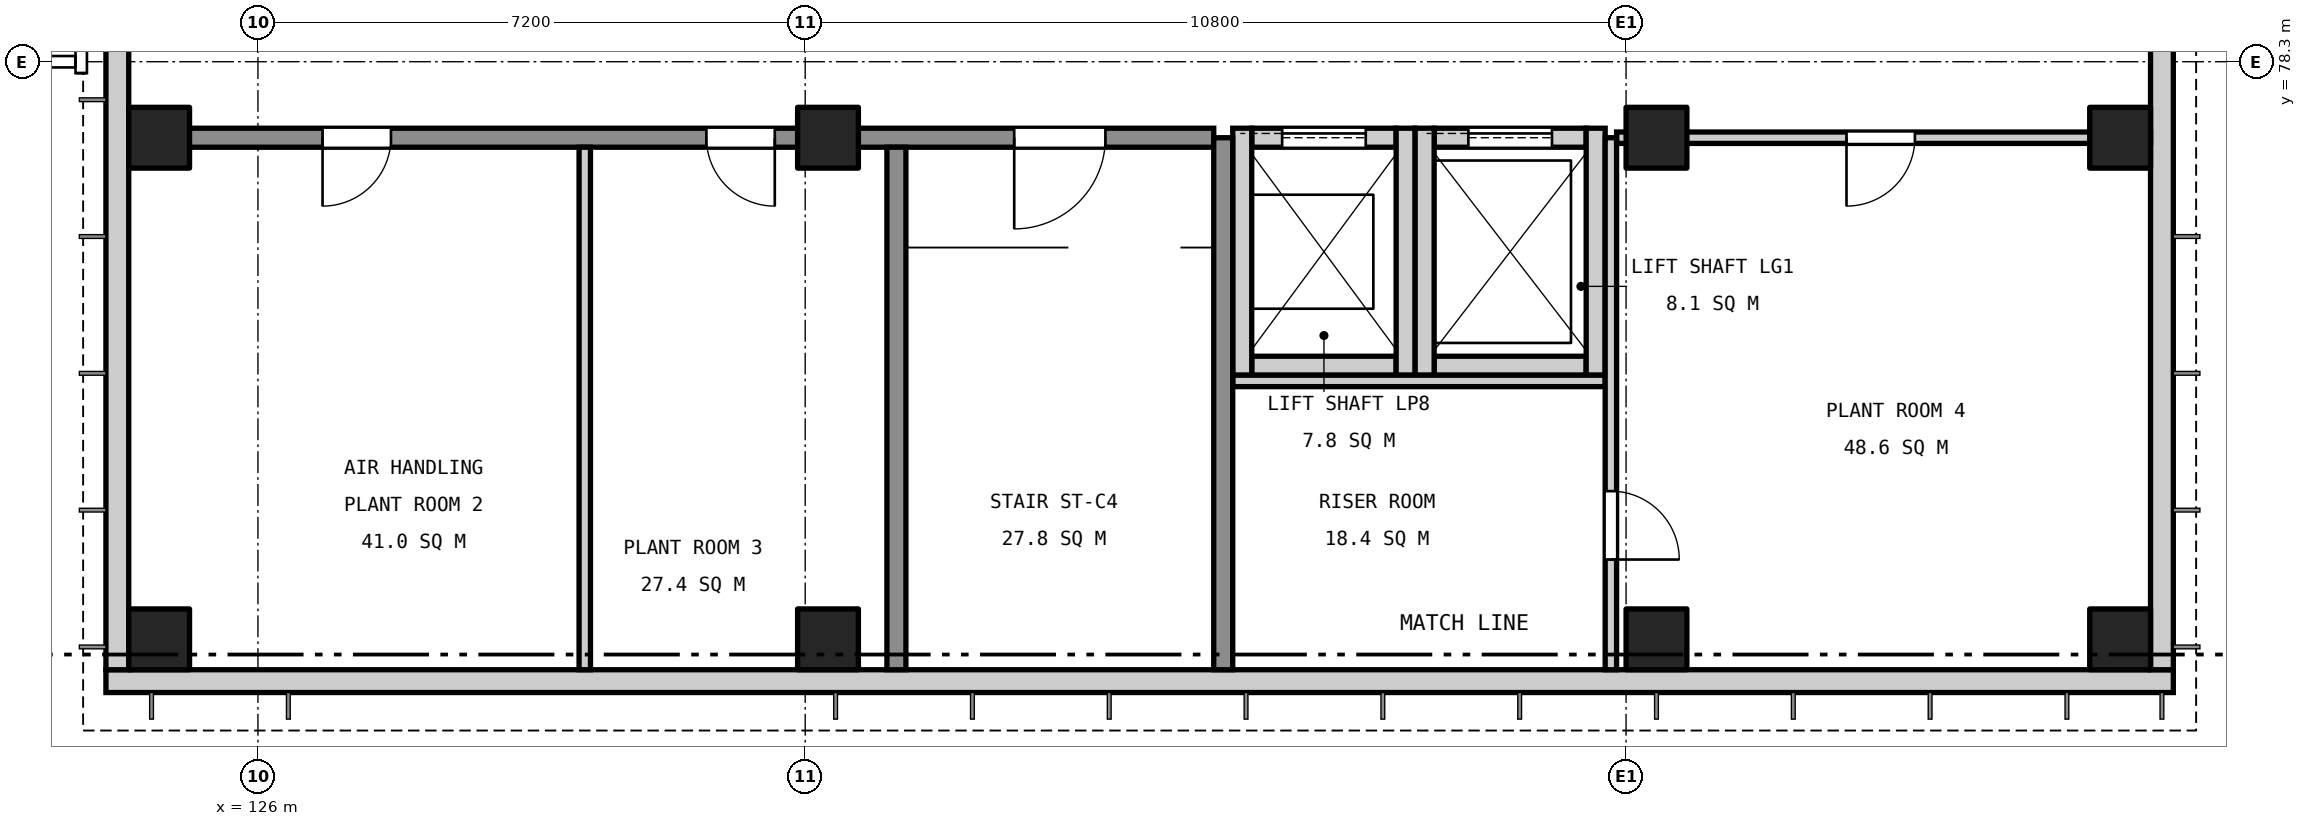
"""IFC4 building model, lengths in metres.
Left out: names, types, materials, properties, quantities, classifications, styles, units other than length and angle.
Written with IfcOpenShell. Run it as: python <this file> out.ifc"""

import sys

from ifc_helpers import new_model, si_unit, direction, frame, frame_2d, origin, origin_2d, place, context, subcontext, project, spatial, rectangle, extrude, element, fill, save


model = new_model("IFC4")
c1 = context("Model", 3, precision=1e-05, world=origin(), true_north=direction((0.0, 1.0)))
c2 = subcontext(c1, "Body", "Model", "MODEL_VIEW")
j1 = project(units=[si_unit("LENGTHUNIT", "METRE"), si_unit("PLANEANGLEUNIT", "RADIAN")], contexts=[c1])
p1 = place(None, origin())
s1 = spatial("IfcSite", under=j1, at=p1, CompositionType="ELEMENT")
p2 = place(p1, origin())
s2 = spatial("IfcBuilding", under=s1, at=p2, CompositionType="ELEMENT")
p3 = place(p2, frame((0.0, 0.0, 22.2)))
s3 = spatial("IfcBuildingStorey", under=s2, at=p3, CompositionType="ELEMENT", Elevation=22.2)
p4 = place(p3, frame((139.075, 74.3, 0.0), z_axis=(0.0, 0.0, 1.0), x_axis=(1.0, 0.0, 0.0)))
e1 = element("IfcWall", 1, at=p4, inside=s3, PredefinedType="SOLIDWALL", context=c2, shape_type="SweptSolid", body=[
    extrude(rectangle(XDim=1.9, YDim=0.25, at=frame_2d((0.95, 0.0))), origin(), (0.0, 0.0, 1.0), 4.35),
])
p5 = place(p3, frame((139.075, 77.3, 0.0), z_axis=(0.0, 0.0, 1.0), x_axis=(1.0, 0.0, 0.0)))
e2 = element("IfcWall", 2, at=p5, inside=s3, PredefinedType="SOLIDWALL", context=c2, shape_type="SweptSolid", body=[
    extrude(rectangle(XDim=1.9, YDim=0.25, at=frame_2d((0.95, 0.0))), origin(), (0.0, 0.0, 1.0), 4.35),
])
p6 = place(p5, frame((0.4, 0.0, 0.0)))
e3 = element("IfcOpeningElement", 3, at=p6, cuts=e2, PredefinedType="OPENING", context=c2, shape_type="SweptSolid", body=[
    extrude(rectangle(XDim=1.1, YDim=2.1, at=frame_2d((0.55, 1.05))), frame((0.0, 0.135, 0.0), z_axis=(0.0, -1.0, 0.0), x_axis=(1.0, 0.0, 0.0)), (0.0, 0.0, 1.0), 0.27),
])
for number, where, z_axis, x_axis in (
    (4, (138.95, 74.175, 0.0), (0.0, 0.0, 1.0), (0.0, 1.0, 0.0)),
    (5, (141.1, 74.175, 0.0), (0.0, 0.0, 1.0), (0.0, 1.0, 0.0)),
):
    element("IfcWall", number, at=place(p3, frame(where, z_axis=z_axis, x_axis=x_axis)), inside=s3, PredefinedType="SOLIDWALL", context=c2, shape_type="SweptSolid", body=[
        extrude(rectangle(XDim=3.25, YDim=0.25, at=frame_2d((1.625, 0.0))), origin(), (0.0, 0.0, 1.0), 4.35),
    ])
p7 = place(p3, frame((141.475, 74.3, 0.0), z_axis=(0.0, 0.0, 1.0), x_axis=(1.0, 0.0, 0.0)))
e6 = element("IfcWall", 6, at=p7, inside=s3, PredefinedType="SOLIDWALL", context=c2, shape_type="SweptSolid", body=[
    extrude(rectangle(XDim=2.0, YDim=0.25, at=frame_2d((1.0, 0.0))), origin(), (0.0, 0.0, 1.0), 4.35),
])
p8 = place(p3, frame((141.475, 77.3, 0.0), z_axis=(0.0, 0.0, 1.0), x_axis=(1.0, 0.0, 0.0)))
e7 = element("IfcWall", 7, at=p8, inside=s3, PredefinedType="SOLIDWALL", context=c2, shape_type="SweptSolid", body=[
    extrude(rectangle(XDim=2.0, YDim=0.25, at=frame_2d((1.0, 0.0))), origin(), (0.0, 0.0, 1.0), 4.35),
])
p9 = place(p8, frame((0.45, 0.0, 0.0)))
e8 = element("IfcOpeningElement", 8, at=p9, cuts=e7, PredefinedType="OPENING", context=c2, shape_type="SweptSolid", body=[
    extrude(rectangle(XDim=1.1, YDim=2.1, at=frame_2d((0.55, 1.05))), frame((0.0, 0.135, 0.0), z_axis=(0.0, -1.0, 0.0), x_axis=(1.0, 0.0, 0.0)), (0.0, 0.0, 1.0), 0.27),
])
for number, where, z_axis, x_axis in (
    (9, (141.35, 74.175, 0.0), (0.0, 0.0, 1.0), (0.0, 1.0, 0.0)),
    (10, (143.6, 74.175, 0.0), (0.0, 0.0, 1.0), (0.0, 1.0, 0.0)),
):
    element("IfcWall", number, at=place(p3, frame(where, z_axis=z_axis, x_axis=x_axis)), inside=s3, PredefinedType="SOLIDWALL", context=c2, shape_type="SweptSolid", body=[
        extrude(rectangle(XDim=3.25, YDim=0.25, at=frame_2d((1.625, 0.0))), origin(), (0.0, 0.0, 1.0), 4.35),
    ])
for number, where, z_axis, x_axis in (
    (11, (124.7, 70.7, 0.0), (0.0, 0.0, 1.0), (1.0, 0.0, 0.0)),
    (12, (124.7, 77.3, 0.0), (0.0, 0.0, 1.0), (1.0, 0.0, 0.0)),
    (13, (133.5, 70.7, 0.0), (0.0, 0.0, 1.0), (1.0, 0.0, 0.0)),
    (14, (133.5, 77.3, 0.0), (0.0, 0.0, 1.0), (1.0, 0.0, 0.0)),
    (15, (144.4, 70.7, 0.0), (0.0, 0.0, 1.0), (1.0, 0.0, 0.0)),
    (16, (144.4, 77.3, 0.0), (0.0, 0.0, 1.0), (1.0, 0.0, 0.0)),
    (17, (150.5, 70.7, 0.0), (0.0, 0.0, 1.0), (1.0, 0.0, 0.0)),
    (18, (150.5, 77.3, 0.0), (0.0, 0.0, 1.0), (1.0, 0.0, 0.0)),
):
    element("IfcColumn", number, at=place(p3, frame(where, z_axis=z_axis, x_axis=x_axis)), inside=s3, PredefinedType="COLUMN", context=c2, shape_type="SweptSolid", body=[
        extrude(rectangle(XDim=0.8, YDim=0.8, at=origin_2d()), origin(), (0.0, 0.0, 1.0), 4.8),
    ])
p10 = place(p3, frame((124.0, 70.15, 0.0), z_axis=(0.0, 0.0, 1.0), x_axis=(1.0, 0.0, 0.0)))
e19 = element("IfcWall", 19, at=p10, inside=s3, PredefinedType="SOLIDWALL", context=c2, shape_type="SweptSolid", body=[
    extrude(rectangle(XDim=27.2, YDim=0.3, at=frame_2d((13.6, 0.0))), origin(), (0.0, 0.0, 1.0), 4.35),
])
for number, where, z_axis, x_axis in (
    (20, (124.15, 70.3, 0.0), (0.0, 0.0, 1.0), (0.0, 1.0, 0.0)),
    (21, (151.05, 70.3, 0.0), (0.0, 0.0, 1.0), (0.0, 1.0, 0.0)),
):
    element("IfcWall", number, at=place(p3, frame(where, z_axis=z_axis, x_axis=x_axis)), inside=s3, PredefinedType="SOLIDWALL", context=c2, shape_type="SweptSolid", body=[
        extrude(rectangle(XDim=36.5, YDim=0.3, at=frame_2d((18.25, 0.0))), origin(), (0.0, 0.0, 1.0), 4.35),
    ])
p11 = place(p3, frame((138.825, 74.1, 0.0), z_axis=(0.0, 0.0, 1.0), x_axis=(1.0, 0.0, 0.0)))
e22 = element("IfcWall", 22, at=p11, inside=s3, PredefinedType="SOLIDWALL", context=c2, shape_type="SweptSolid", body=[
    extrude(rectangle(XDim=4.9, YDim=0.15, at=frame_2d((2.45, 0.0))), origin(), (0.0, 0.0, 1.0), 4.35),
])
p12 = place(p3, frame((124.3, 77.3, 0.0), z_axis=(0.0, 0.0, 1.0), x_axis=(1.0, 0.0, 0.0)))
e23 = element("IfcWall", 23, at=p12, inside=s3, PredefinedType="SOLIDWALL", context=c2, shape_type="SweptSolid", body=[
    extrude(rectangle(XDim=14.275, YDim=0.25, at=frame_2d((7.137, 0.0))), origin(), (0.0, 0.0, 1.0), 4.35),
])
p13 = place(p12, frame((2.55, 0.0, 0.0)))
e24 = element("IfcOpeningElement", 24, at=p13, cuts=e23, PredefinedType="OPENING", context=c2, shape_type="SweptSolid", body=[
    extrude(rectangle(XDim=0.9, YDim=2.1, at=frame_2d((0.45, 1.05))), frame((0.0, 0.135, 0.0), z_axis=(0.0, -1.0, 0.0), x_axis=(1.0, 0.0, 0.0)), (0.0, 0.0, 1.0), 0.27),
])
p14 = place(p12, frame((7.6, 0.0, 0.0)))
e25 = element("IfcOpeningElement", 25, at=p14, cuts=e23, PredefinedType="OPENING", context=c2, shape_type="SweptSolid", body=[
    extrude(rectangle(XDim=0.9, YDim=2.1, at=frame_2d((0.45, 1.05))), frame((0.0, 0.135, 0.0), z_axis=(0.0, -1.0, 0.0), x_axis=(1.0, 0.0, 0.0)), (0.0, 0.0, 1.0), 0.27),
])
p15 = place(p12, frame((11.65, 0.0, 0.0)))
e26 = element("IfcOpeningElement", 26, at=p15, cuts=e23, PredefinedType="OPENING", context=c2, shape_type="SweptSolid", body=[
    extrude(rectangle(XDim=1.2, YDim=2.1, at=frame_2d((0.6, 1.05))), frame((0.0, 0.135, 0.0), z_axis=(0.0, -1.0, 0.0), x_axis=(1.0, 0.0, 0.0)), (0.0, 0.0, 1.0), 0.27),
])
p16 = place(p3, frame((143.875, 77.3, 0.0), z_axis=(0.0, 0.0, 1.0), x_axis=(1.0, 0.0, 0.0)))
e27 = element("IfcWall", 27, at=p16, inside=s3, PredefinedType="SOLIDWALL", context=c2, shape_type="SweptSolid", body=[
    extrude(rectangle(XDim=7.025, YDim=0.15, at=frame_2d((3.512, 0.0))), origin(), (0.0, 0.0, 1.0), 4.35),
])
p17 = place(p16, frame((3.025, 0.0, 0.0)))
e28 = element("IfcOpeningElement", 28, at=p17, cuts=e27, PredefinedType="OPENING", context=c2, shape_type="SweptSolid", body=[
    extrude(rectangle(XDim=0.9, YDim=2.1, at=frame_2d((0.45, 1.05))), frame((0.0, 0.085, 0.0), z_axis=(0.0, -1.0, 0.0), x_axis=(1.0, 0.0, 0.0)), (0.0, 0.0, 1.0), 0.17),
])
p18 = place(p3, frame((130.3, 70.3, 0.0), z_axis=(0.0, 0.0, 1.0), x_axis=(0.0, 1.0, 0.0)))
e29 = element("IfcWall", 29, at=p18, inside=s3, PredefinedType="SOLIDWALL", context=c2, shape_type="SweptSolid", body=[
    extrude(rectangle(XDim=6.875, YDim=0.15, at=frame_2d((3.438, 0.0))), origin(), (0.0, 0.0, 1.0), 4.35),
])
p19 = place(p3, frame((134.4, 70.3, 0.0), z_axis=(0.0, 0.0, 1.0), x_axis=(0.0, 1.0, 0.0)))
e30 = element("IfcWall", 30, at=p19, inside=s3, PredefinedType="SOLIDWALL", context=c2, shape_type="SweptSolid", body=[
    extrude(rectangle(XDim=6.875, YDim=0.25, at=frame_2d((3.438, 0.0))), origin(), (0.0, 0.0, 1.0), 4.35),
])
p20 = place(p3, frame((138.7, 70.3, 0.0), z_axis=(0.0, 0.0, 1.0), x_axis=(0.0, 1.0, 0.0)))
e31 = element("IfcWall", 31, at=p20, inside=s3, PredefinedType="SOLIDWALL", context=c2, shape_type="SweptSolid", body=[
    extrude(rectangle(XDim=7.0, YDim=0.25, at=frame_2d((3.5, 0.0))), origin(), (0.0, 0.0, 1.0), 4.35),
])
p21 = place(p3, frame((143.8, 70.3, 0.0), z_axis=(0.0, 0.0, 1.0), x_axis=(0.0, 1.0, 0.0)))
e32 = element("IfcWall", 32, at=p21, inside=s3, PredefinedType="SOLIDWALL", context=c2, shape_type="SweptSolid", body=[
    extrude(rectangle(XDim=7.0, YDim=0.15, at=frame_2d((3.5, 0.0))), origin(), (0.0, 0.0, 1.0), 4.35),
])
p22 = place(p21, frame((1.45, 0.0, 0.0)))
e33 = element("IfcOpeningElement", 33, at=p22, cuts=e32, PredefinedType="OPENING", context=c2, shape_type="SweptSolid", body=[
    extrude(rectangle(XDim=0.9, YDim=2.1, at=frame_2d((0.45, 1.05))), frame((0.0, 0.085, 0.0), z_axis=(0.0, -1.0, 0.0), x_axis=(1.0, 0.0, 0.0)), (0.0, 0.0, 1.0), 0.17),
])
p23 = place(p13, frame((0.9, 0.0, 0.0), z_axis=(0.0, 0.0, 1.0), x_axis=(-1.0, 0.0, 0.0)))
e34 = element("IfcDoor", 34, at=p23, inside=s3, OperationType="SINGLE_SWING_RIGHT", PredefinedType="DOOR", context=c2, shape_type="SweptSolid", body=[
    extrude(rectangle(XDim=0.9, YDim=2.1, at=frame_2d((0.45, 1.05))), frame((0.0, 0.025, 0.0), z_axis=(0.0, -1.0, 0.0), x_axis=(1.0, 0.0, 0.0)), (0.0, 0.0, 1.0), 0.05),
])
fill(e24, e34)
p24 = place(p14, frame((0.9, 0.0, 0.0), z_axis=(0.0, 0.0, 1.0), x_axis=(-1.0, 0.0, 0.0)))
e35 = element("IfcDoor", 35, at=p24, inside=s3, OperationType="SINGLE_SWING_LEFT", PredefinedType="DOOR", context=c2, shape_type="SweptSolid", body=[
    extrude(rectangle(XDim=0.9, YDim=2.1, at=frame_2d((0.45, 1.05))), frame((0.0, 0.025, 0.0), z_axis=(0.0, -1.0, 0.0), x_axis=(1.0, 0.0, 0.0)), (0.0, 0.0, 1.0), 0.05),
])
fill(e25, e35)
p25 = place(p17, frame((0.9, 0.0, 0.0), z_axis=(0.0, 0.0, 1.0), x_axis=(-1.0, 0.0, 0.0)))
e36 = element("IfcDoor", 36, at=p25, inside=s3, OperationType="SINGLE_SWING_RIGHT", PredefinedType="DOOR", context=c2, shape_type="SweptSolid", body=[
    extrude(rectangle(XDim=0.9, YDim=2.1, at=frame_2d((0.45, 1.05))), frame((0.0, 0.025, 0.0), z_axis=(0.0, -1.0, 0.0), x_axis=(1.0, 0.0, 0.0)), (0.0, 0.0, 1.0), 0.05),
])
fill(e28, e36)
p26 = place(p22, frame((0.9, 0.0, 0.0), z_axis=(0.0, 0.0, 1.0), x_axis=(-1.0, 0.0, 0.0)))
e37 = element("IfcDoor", 37, at=p26, inside=s3, OperationType="SINGLE_SWING_RIGHT", PredefinedType="DOOR", context=c2, shape_type="SweptSolid", body=[
    extrude(rectangle(XDim=0.9, YDim=2.1, at=frame_2d((0.45, 1.05))), frame((0.0, 0.025, 0.0), z_axis=(0.0, -1.0, 0.0), x_axis=(1.0, 0.0, 0.0)), (0.0, 0.0, 1.0), 0.05),
])
fill(e33, e37)
p27 = place(p15, frame((1.2, 0.0, 0.0), z_axis=(0.0, 0.0, 1.0), x_axis=(-1.0, 0.0, 0.0)))
e38 = element("IfcDoor", 38, at=p27, inside=s3, OperationType="SINGLE_SWING_RIGHT", PredefinedType="DOOR", context=c2, shape_type="SweptSolid", body=[
    extrude(rectangle(XDim=1.2, YDim=2.1, at=frame_2d((0.6, 1.05))), frame((0.0, 0.025, 0.0), z_axis=(0.0, -1.0, 0.0), x_axis=(1.0, 0.0, 0.0)), (0.0, 0.0, 1.0), 0.05),
])
fill(e26, e38)
p28 = place(p6, origin())
e39 = element("IfcDoor", 39, at=p28, inside=s3, OperationType="SLIDING_TO_LEFT", PredefinedType="DOOR", context=c2, shape_type="SweptSolid", body=[
    extrude(rectangle(XDim=1.1, YDim=2.1, at=frame_2d((0.55, 1.05))), frame((0.0, 0.025, 0.0), z_axis=(0.0, -1.0, 0.0), x_axis=(1.0, 0.0, 0.0)), (0.0, 0.0, 1.0), 0.05),
])
fill(e3, e39)
p29 = place(p9, origin())
e40 = element("IfcDoor", 40, at=p29, inside=s3, OperationType="SLIDING_TO_LEFT", PredefinedType="DOOR", context=c2, shape_type="SweptSolid", body=[
    extrude(rectangle(XDim=1.1, YDim=2.1, at=frame_2d((0.55, 1.05))), frame((0.0, 0.025, 0.0), z_axis=(0.0, -1.0, 0.0), x_axis=(1.0, 0.0, 0.0)), (0.0, 0.0, 1.0), 0.05),
])
fill(e8, e40)
save(model, sys.argv[1])
